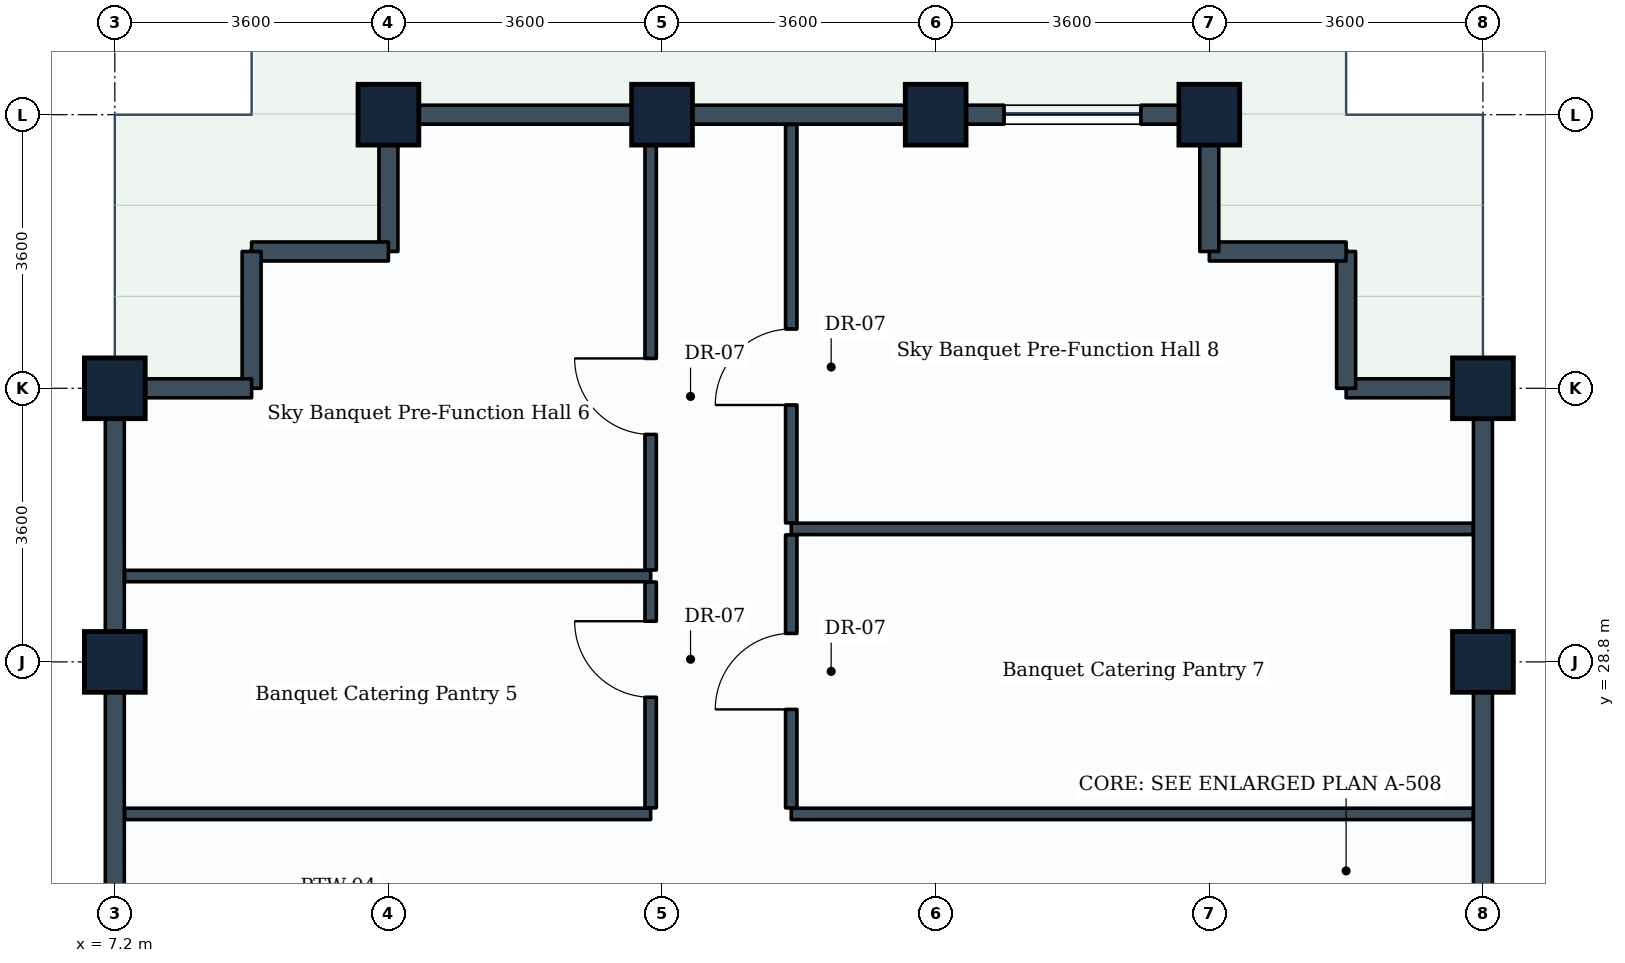
"""IFC4 building model, lengths in metres.
Left out: names, types, materials, properties, quantities, classifications, styles, units other than length and angle.
Written with IfcOpenShell. Run it as: python <this file> out.ifc"""

import sys

from ifc_helpers import new_model, si_unit, direction, frame, frame_2d, origin, origin_2d, place, context, subcontext, project, spatial, rectangle, extrude, element, fill, save


model = new_model("IFC4")
c1 = context("Model", 3, precision=1e-05, world=origin(), true_north=direction((0.0, 1.0)))
c2 = subcontext(c1, "Body", "Model", "MODEL_VIEW")
j1 = project(units=[si_unit("LENGTHUNIT", "METRE"), si_unit("PLANEANGLEUNIT", "RADIAN")], contexts=[c1])
p1 = place(None, origin())
s1 = spatial("IfcSite", under=j1, at=p1, CompositionType="ELEMENT")
p2 = place(p1, origin())
s2 = spatial("IfcBuilding", under=s1, at=p2, CompositionType="ELEMENT")
p3 = place(p2, frame((0.0, 0.0, 221.0)))
s3 = spatial("IfcBuildingStorey", under=s2, at=p3, CompositionType="ELEMENT", Elevation=221.0)
for number, where, z_axis, x_axis in (
    (1, (7.2, 28.8, 0.0), (0.0, 0.0, 1.0), (0.0, 1.0, 0.0)),
    (2, (7.2, 32.4, 0.0), (0.0, 0.0, 1.0), (0.0, 1.0, 0.0)),
    (3, (10.8, 36.0, 0.0), (0.0, 0.0, 1.0), (1.0, 0.0, 0.0)),
    (4, (14.4, 36.0, 0.0), (0.0, 0.0, 1.0), (1.0, 0.0, 0.0)),
    (5, (18.0, 36.0, 0.0), (0.0, 0.0, 1.0), (1.0, 0.0, 0.0)),
    (6, (21.6, 36.0, 0.0), (0.0, 0.0, 1.0), (1.0, 0.0, 0.0)),
    (7, (25.2, 28.8, 0.0), (0.0, 0.0, 1.0), (0.0, 1.0, 0.0)),
    (8, (25.2, 32.4, 0.0), (0.0, 0.0, 1.0), (0.0, 1.0, 0.0)),
):
    element("IfcColumn", number, at=place(p3, frame(where, z_axis=z_axis, x_axis=x_axis)), inside=s3, PredefinedType="COLUMN", context=c2, shape_type="SweptSolid", body=[
        extrude(rectangle(XDim=0.8, YDim=0.8, at=origin_2d()), origin(), (0.0, 0.0, 1.0), 3.6),
    ])
p4 = place(p3, frame((25.2, 28.8, 0.0), z_axis=(0.0, 0.0, 1.0), x_axis=(0.0, -1.0, 0.0)))
e9 = element("IfcWall", 9, at=p4, inside=s3, PredefinedType="STANDARD", context=c2, shape_type="SweptSolid", body=[
    extrude(rectangle(XDim=3.6, YDim=0.25, at=frame_2d((1.8, 0.0))), origin(), (0.0, 0.0, 1.0), 2.83),
])
p5 = place(p3, frame((25.2, 32.4, 0.0), z_axis=(0.0, 0.0, 1.0), x_axis=(0.0, -1.0, 0.0)))
e10 = element("IfcWall", 10, at=p5, inside=s3, PredefinedType="STANDARD", context=c2, shape_type="SweptSolid", body=[
    extrude(rectangle(XDim=3.6, YDim=0.25, at=frame_2d((1.8, 0.0))), origin(), (0.0, 0.0, 1.0), 2.83),
])
p6 = place(p3, frame((23.4, 32.4, 0.0), z_axis=(0.0, 0.0, 1.0), x_axis=(1.0, 0.0, 0.0)))
e11 = element("IfcWall", 11, at=p6, inside=s3, PredefinedType="STANDARD", context=c2, shape_type="SweptSolid", body=[
    extrude(rectangle(XDim=1.8, YDim=0.25, at=frame_2d((0.9, 0.0))), origin(), (0.0, 0.0, 1.0), 2.83),
])
p7 = place(p3, frame((23.4, 32.4, 0.0), z_axis=(0.0, 0.0, 1.0), x_axis=(0.0, 1.0, 0.0)))
e12 = element("IfcWall", 12, at=p7, inside=s3, PredefinedType="STANDARD", context=c2, shape_type="SweptSolid", body=[
    extrude(rectangle(XDim=1.8, YDim=0.25, at=frame_2d((0.9, 0.0))), origin(), (0.0, 0.0, 1.0), 3.335),
])
p8 = place(p3, frame((21.6, 34.2, 0.0), z_axis=(0.0, 0.0, 1.0), x_axis=(1.0, 0.0, 0.0)))
e13 = element("IfcWall", 13, at=p8, inside=s3, PredefinedType="STANDARD", context=c2, shape_type="SweptSolid", body=[
    extrude(rectangle(XDim=1.8, YDim=0.25, at=frame_2d((0.9, 0.0))), origin(), (0.0, 0.0, 1.0), 3.335),
])
p9 = place(p3, frame((21.6, 34.2, 0.0), z_axis=(0.0, 0.0, 1.0), x_axis=(0.0, 1.0, 0.0)))
e14 = element("IfcWall", 14, at=p9, inside=s3, PredefinedType="STANDARD", context=c2, shape_type="SweptSolid", body=[
    extrude(rectangle(XDim=1.8, YDim=0.25, at=frame_2d((0.9, 0.0))), origin(), (0.0, 0.0, 1.0), 2.83),
])
p10 = place(p3, frame((18.0, 36.0, 0.0), z_axis=(0.0, 0.0, 1.0), x_axis=(1.0, 0.0, 0.0)))
e15 = element("IfcWall", 15, at=p10, inside=s3, PredefinedType="STANDARD", context=c2, shape_type="SweptSolid", body=[
    extrude(rectangle(XDim=3.6, YDim=0.25, at=frame_2d((1.8, 0.0))), origin(), (0.0, 0.0, 1.0), 2.83),
])
p11 = place(p10, frame((0.9, 0.0, 0.85)))
e16 = element("IfcOpeningElement", 16, at=p11, cuts=e15, PredefinedType="OPENING", context=c2, shape_type="SweptSolid", body=[
    extrude(rectangle(XDim=1.8, YDim=1.35, at=frame_2d((0.9, 0.675))), frame((0.0, 0.135, 0.0), z_axis=(0.0, -1.0, 0.0), x_axis=(1.0, 0.0, 0.0)), (0.0, 0.0, 1.0), 0.27),
])
p12 = place(p3, frame((14.4, 36.0, 0.0), z_axis=(0.0, 0.0, 1.0), x_axis=(1.0, 0.0, 0.0)))
e17 = element("IfcWall", 17, at=p12, inside=s3, PredefinedType="STANDARD", context=c2, shape_type="SweptSolid", body=[
    extrude(rectangle(XDim=3.6, YDim=0.25, at=frame_2d((1.8, 0.0))), origin(), (0.0, 0.0, 1.0), 2.83),
])
p13 = place(p3, frame((10.8, 36.0, 0.0), z_axis=(0.0, 0.0, 1.0), x_axis=(1.0, 0.0, 0.0)))
e18 = element("IfcWall", 18, at=p13, inside=s3, PredefinedType="STANDARD", context=c2, shape_type="SweptSolid", body=[
    extrude(rectangle(XDim=3.6, YDim=0.25, at=frame_2d((1.8, 0.0))), origin(), (0.0, 0.0, 1.0), 2.83),
])
p14 = place(p3, frame((10.8, 34.2, 0.0), z_axis=(0.0, 0.0, 1.0), x_axis=(0.0, 1.0, 0.0)))
e19 = element("IfcWall", 19, at=p14, inside=s3, PredefinedType="STANDARD", context=c2, shape_type="SweptSolid", body=[
    extrude(rectangle(XDim=1.8, YDim=0.25, at=frame_2d((0.9, 0.0))), origin(), (0.0, 0.0, 1.0), 2.83),
])
for number, where, z_axis, x_axis in (
    (20, (9.0, 34.2, 0.0), (0.0, 0.0, 1.0), (1.0, 0.0, 0.0)),
    (21, (9.0, 32.4, 0.0), (0.0, 0.0, 1.0), (0.0, 1.0, 0.0)),
):
    element("IfcWall", number, at=place(p3, frame(where, z_axis=z_axis, x_axis=x_axis)), inside=s3, PredefinedType="STANDARD", context=c2, shape_type="SweptSolid", body=[
        extrude(rectangle(XDim=1.8, YDim=0.25, at=frame_2d((0.9, 0.0))), origin(), (0.0, 0.0, 1.0), 3.335),
    ])
p15 = place(p3, frame((7.2, 32.4, 0.0), z_axis=(0.0, 0.0, 1.0), x_axis=(1.0, 0.0, 0.0)))
e22 = element("IfcWall", 22, at=p15, inside=s3, PredefinedType="STANDARD", context=c2, shape_type="SweptSolid", body=[
    extrude(rectangle(XDim=1.8, YDim=0.25, at=frame_2d((0.9, 0.0))), origin(), (0.0, 0.0, 1.0), 2.83),
])
p16 = place(p3, frame((7.2, 28.8, 0.0), z_axis=(0.0, 0.0, 1.0), x_axis=(0.0, 1.0, 0.0)))
e23 = element("IfcWall", 23, at=p16, inside=s3, PredefinedType="STANDARD", context=c2, shape_type="SweptSolid", body=[
    extrude(rectangle(XDim=3.6, YDim=0.25, at=frame_2d((1.8, 0.0))), origin(), (0.0, 0.0, 1.0), 2.83),
])
p17 = place(p3, frame((7.2, 25.2, 0.0), z_axis=(0.0, 0.0, 1.0), x_axis=(0.0, 1.0, 0.0)))
e24 = element("IfcWall", 24, at=p17, inside=s3, PredefinedType="STANDARD", context=c2, shape_type="SweptSolid", body=[
    extrude(rectangle(XDim=3.6, YDim=0.25, at=frame_2d((1.8, 0.0))), origin(), (0.0, 0.0, 1.0), 2.83),
])
for number, where, z_axis, x_axis in (
    (25, (7.329, 26.8, 0.0), (0.0, 0.0, 1.0), (1.0, 0.0, 0.0)),
    (26, (7.329, 29.93, 0.0), (0.0, 0.0, 1.0), (1.0, 0.0, 0.0)),
):
    element("IfcWall", number, at=place(p3, frame(where, z_axis=z_axis, x_axis=x_axis)), inside=s3, PredefinedType="PARTITIONING", context=c2, shape_type="SweptSolid", body=[
        extrude(rectangle(XDim=6.921, YDim=0.15, at=frame_2d((3.46, 0.0))), origin(), (0.0, 0.0, 1.0), 2.83),
    ])
p18 = place(p3, frame((14.25, 26.879, 0.0), z_axis=(0.0, 0.0, 1.0), x_axis=(0.0, 1.0, 0.0)))
e27 = element("IfcWall", 27, at=p18, inside=s3, PredefinedType="PARTITIONING", context=c2, shape_type="SweptSolid", body=[
    extrude(rectangle(XDim=2.972, YDim=0.15, at=frame_2d((1.486, 0.0))), origin(), (0.0, 0.0, 1.0), 3.03),
])
p19 = place(p18, frame((1.456, 0.0, 0.0)))
e28 = element("IfcOpeningElement", 28, at=p19, cuts=e27, PredefinedType="OPENING", context=c2, shape_type="SweptSolid", body=[
    extrude(rectangle(XDim=1.0, YDim=2.1, at=frame_2d((0.5, 1.05))), frame((0.0, 0.085, 0.0), z_axis=(0.0, -1.0, 0.0), x_axis=(1.0, 0.0, 0.0)), (0.0, 0.0, 1.0), 0.17),
])
p20 = place(p3, frame((14.25, 30.009, 0.0), z_axis=(0.0, 0.0, 1.0), x_axis=(0.0, 1.0, 0.0)))
e29 = element("IfcWall", 29, at=p20, inside=s3, PredefinedType="PARTITIONING", context=c2, shape_type="SweptSolid", body=[
    extrude(rectangle(XDim=5.862, YDim=0.15, at=frame_2d((2.931, 0.0))), origin(), (0.0, 0.0, 1.0), 2.83),
])
p21 = place(p20, frame((1.784, 0.0, 0.0)))
e30 = element("IfcOpeningElement", 30, at=p21, cuts=e29, PredefinedType="OPENING", context=c2, shape_type="SweptSolid", body=[
    extrude(rectangle(XDim=1.0, YDim=2.1, at=frame_2d((0.5, 1.05))), frame((0.0, 0.085, 0.0), z_axis=(0.0, -1.0, 0.0), x_axis=(1.0, 0.0, 0.0)), (0.0, 0.0, 1.0), 0.17),
])
for number, where, z_axis, x_axis in (
    (31, (16.1, 26.8, 0.0), (0.0, 0.0, 1.0), (1.0, 0.0, 0.0)),
    (32, (16.1, 30.55, 0.0), (0.0, 0.0, 1.0), (1.0, 0.0, 0.0)),
):
    element("IfcWall", number, at=place(p3, frame(where, z_axis=z_axis, x_axis=x_axis)), inside=s3, PredefinedType="PARTITIONING", context=c2, shape_type="SweptSolid", body=[
        extrude(rectangle(XDim=8.971, YDim=0.15, at=frame_2d((4.485, 0.0))), origin(), (0.0, 0.0, 1.0), 2.83),
    ])
p22 = place(p3, frame((16.1, 26.879, 0.0), z_axis=(0.0, 0.0, 1.0), x_axis=(0.0, 1.0, 0.0)))
e33 = element("IfcWall", 33, at=p22, inside=s3, PredefinedType="PARTITIONING", context=c2, shape_type="SweptSolid", body=[
    extrude(rectangle(XDim=3.592, YDim=0.15, at=frame_2d((1.796, 0.0))), origin(), (0.0, 0.0, 1.0), 3.03),
])
p23 = place(p22, frame((1.296, 0.0, 0.0)))
e34 = element("IfcOpeningElement", 34, at=p23, cuts=e33, PredefinedType="OPENING", context=c2, shape_type="SweptSolid", body=[
    extrude(rectangle(XDim=1.0, YDim=2.1, at=frame_2d((0.5, 1.05))), frame((0.0, 0.085, 0.0), z_axis=(0.0, -1.0, 0.0), x_axis=(1.0, 0.0, 0.0)), (0.0, 0.0, 1.0), 0.17),
])
p24 = place(p3, frame((16.1, 30.629, 0.0), z_axis=(0.0, 0.0, 1.0), x_axis=(0.0, 1.0, 0.0)))
e35 = element("IfcWall", 35, at=p24, inside=s3, PredefinedType="PARTITIONING", context=c2, shape_type="SweptSolid", body=[
    extrude(rectangle(XDim=5.242, YDim=0.15, at=frame_2d((2.621, 0.0))), origin(), (0.0, 0.0, 1.0), 2.83),
])
p25 = place(p24, frame((1.551, 0.0, 0.0)))
e36 = element("IfcOpeningElement", 36, at=p25, cuts=e35, PredefinedType="OPENING", context=c2, shape_type="SweptSolid", body=[
    extrude(rectangle(XDim=1.0, YDim=2.1, at=frame_2d((0.5, 1.05))), frame((0.0, 0.085, 0.0), z_axis=(0.0, -1.0, 0.0), x_axis=(1.0, 0.0, 0.0)), (0.0, 0.0, 1.0), 0.17),
])
p26 = place(p11, origin())
e37 = element("IfcWindow", 37, at=p26, inside=s3, PartitioningType="SINGLE_PANEL", PredefinedType="WINDOW", context=c2, shape_type="SweptSolid", body=[
    extrude(rectangle(XDim=1.8, YDim=1.35, at=frame_2d((0.9, 0.675))), frame((0.0, 0.03, 0.0), z_axis=(0.0, -1.0, 0.0), x_axis=(1.0, 0.0, 0.0)), (0.0, 0.0, 1.0), 0.06),
])
fill(e16, e37)
p27 = place(p19, origin())
e38 = element("IfcDoor", 38, at=p27, inside=s3, OperationType="SINGLE_SWING_RIGHT", PredefinedType="DOOR", context=c2, shape_type="SweptSolid", body=[
    extrude(rectangle(XDim=1.0, YDim=2.1, at=frame_2d((0.5, 1.05))), frame((0.0, 0.025, 0.0), z_axis=(0.0, -1.0, 0.0), x_axis=(1.0, 0.0, 0.0)), (0.0, 0.0, 1.0), 0.05),
])
fill(e28, e38)
p28 = place(p21, origin())
e39 = element("IfcDoor", 39, at=p28, inside=s3, OperationType="SINGLE_SWING_RIGHT", PredefinedType="DOOR", context=c2, shape_type="SweptSolid", body=[
    extrude(rectangle(XDim=1.0, YDim=2.1, at=frame_2d((0.5, 1.05))), frame((0.0, 0.025, 0.0), z_axis=(0.0, -1.0, 0.0), x_axis=(1.0, 0.0, 0.0)), (0.0, 0.0, 1.0), 0.05),
])
fill(e30, e39)
p29 = place(p23, origin())
e40 = element("IfcDoor", 40, at=p29, inside=s3, OperationType="SINGLE_SWING_LEFT", PredefinedType="DOOR", context=c2, shape_type="SweptSolid", body=[
    extrude(rectangle(XDim=1.0, YDim=2.1, at=frame_2d((0.5, 1.05))), frame((0.0, 0.025, 0.0), z_axis=(0.0, -1.0, 0.0), x_axis=(1.0, 0.0, 0.0)), (0.0, 0.0, 1.0), 0.05),
])
fill(e34, e40)
p30 = place(p25, origin())
e41 = element("IfcDoor", 41, at=p30, inside=s3, OperationType="SINGLE_SWING_LEFT", PredefinedType="DOOR", context=c2, shape_type="SweptSolid", body=[
    extrude(rectangle(XDim=1.0, YDim=2.1, at=frame_2d((0.5, 1.05))), frame((0.0, 0.025, 0.0), z_axis=(0.0, -1.0, 0.0), x_axis=(1.0, 0.0, 0.0)), (0.0, 0.0, 1.0), 0.05),
])
fill(e36, e41)
save(model, sys.argv[1])
